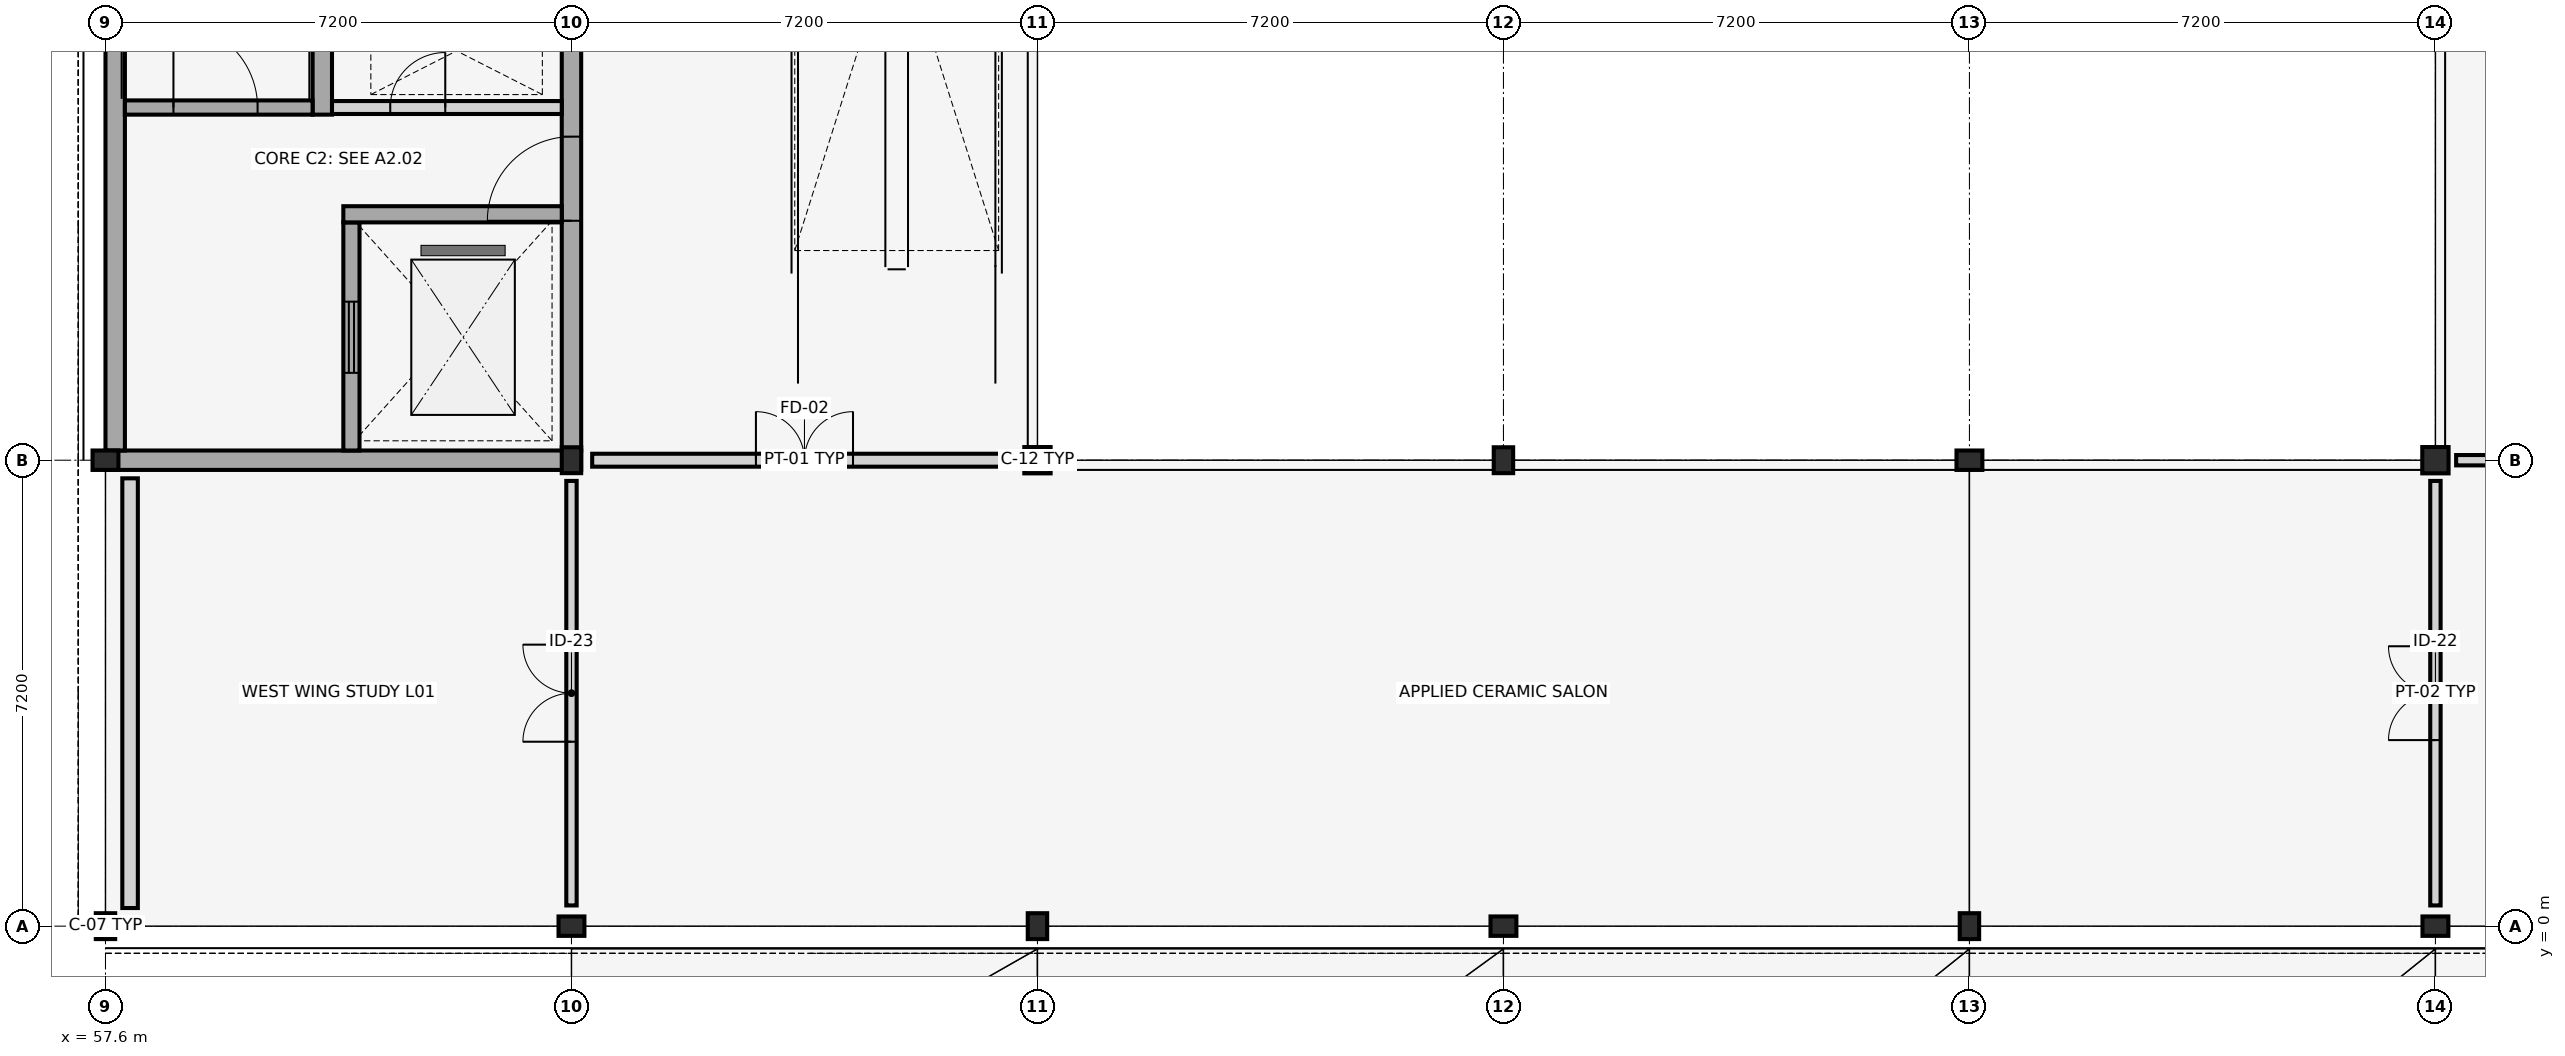
"""IFC4 building model, lengths in metres.
Left out: names, types, materials, properties, quantities, classifications, styles, units other than length and angle.
Written with IfcOpenShell. Run it as: python <this file> out.ifc"""

import sys

from ifc_helpers import new_model, si_unit, direction, frame, frame_2d, origin, origin_2d, place, context, subcontext, project, spatial, rectangle, hollow_circle, i_section, extrude, element, fill, save


model = new_model("IFC4")
c1 = context("Model", 3, precision=1e-05, world=origin(), true_north=direction((0.0, 1.0)))
c2 = subcontext(c1, "Body", "Model", "MODEL_VIEW")
j1 = project(units=[si_unit("LENGTHUNIT", "METRE"), si_unit("PLANEANGLEUNIT", "RADIAN")], contexts=[c1])
p1 = place(None, origin())
s1 = spatial("IfcSite", under=j1, at=p1, CompositionType="ELEMENT")
p2 = place(p1, origin())
s2 = spatial("IfcBuilding", under=s1, at=p2, CompositionType="ELEMENT")
p3 = place(p2, frame((0.0, 0.0, 4.5)))
s3 = spatial("IfcBuildingStorey", under=s2, at=p3, CompositionType="ELEMENT", Elevation=4.5)
for number, where, z_axis, x_axis in (
    (1, (57.6, 0.0, 0.0), (0.0, 0.0, 1.0), (1.0, 0.0, 0.0)),
    (2, (57.6, 7.2, 0.0), (0.0, 0.0, 1.0), (0.0, 1.0, 0.0)),
    (3, (64.8, 0.0, 0.0), (0.0, 0.0, 1.0), (0.0, 1.0, 0.0)),
    (4, (64.8, 7.2, 0.0), (0.0, 0.0, 1.0), (1.0, 0.0, 0.0)),
    (5, (72.0, 0.0, 0.0), (0.0, 0.0, 1.0), (1.0, 0.0, 0.0)),
):
    element("IfcColumn", number, at=place(p3, frame(where, z_axis=z_axis, x_axis=x_axis)), inside=s3, PredefinedType="COLUMN", context=c2, shape_type="SweptSolid", body=[
        extrude(i_section(OverallWidth=0.3, OverallDepth=0.4, WebThickness=0.013, FlangeThickness=0.024, FilletRadius=0.027, at=origin_2d()), origin(), (0.0, 0.0, 1.0), 4.2),
    ])
p4 = place(p3, frame((72.0, 7.2, 0.0), z_axis=(0.0, 0.0, 1.0), x_axis=(0.0, 1.0, 0.0)))
e6 = element("IfcColumn", 6, at=p4, inside=s3, PredefinedType="COLUMN", context=c2, shape_type="SweptSolid", body=[
    extrude(hollow_circle(Radius=0.203, WallThickness=0.016, at=origin_2d()), origin(), (0.0, 0.0, 1.0), 4.2),
])
for number, where, z_axis, x_axis in (
    (7, (79.2, 0.0, 0.0), (0.0, 0.0, 1.0), (0.0, 1.0, 0.0)),
    (8, (79.2, 7.2, 0.0), (0.0, 0.0, 1.0), (1.0, 0.0, 0.0)),
    (9, (86.4, 0.0, 0.0), (0.0, 0.0, 1.0), (1.0, 0.0, 0.0)),
    (10, (86.4, 7.2, 0.0), (0.0, 0.0, 1.0), (0.0, 1.0, 0.0)),
    (11, (93.6, 0.0, 0.0), (0.0, 0.0, 1.0), (0.0, 1.0, 0.0)),
):
    element("IfcColumn", number, at=place(p3, frame(where, z_axis=z_axis, x_axis=x_axis)), inside=s3, PredefinedType="COLUMN", context=c2, shape_type="SweptSolid", body=[
        extrude(i_section(OverallWidth=0.3, OverallDepth=0.4, WebThickness=0.013, FlangeThickness=0.024, FilletRadius=0.027, at=origin_2d()), origin(), (0.0, 0.0, 1.0), 4.2),
    ])
p5 = place(p3, frame((93.6, 7.2, 0.0), z_axis=(0.0, 0.0, 1.0), x_axis=(1.0, 0.0, 0.0)))
e12 = element("IfcColumn", 12, at=p5, inside=s3, PredefinedType="COLUMN", context=c2, shape_type="SweptSolid", body=[
    extrude(hollow_circle(Radius=0.203, WallThickness=0.016, at=origin_2d()), origin(), (0.0, 0.0, 1.0), 4.2),
])
p6 = place(p3, frame((57.98, 6.92, 0.0), z_axis=(0.0, 0.0, 1.0), x_axis=(0.0, -1.0, 0.0)))
e13 = element("IfcWall", 13, at=p6, inside=s3, PredefinedType="STANDARD", context=c2, shape_type="SweptSolid", body=[
    extrude(rectangle(XDim=6.64, YDim=0.24, at=frame_2d((3.32, 0.0))), origin(), (0.0, 0.0, 1.0), 3.58),
])
p7 = place(p3, frame((57.6, 7.2, 0.0), z_axis=(0.0, 0.0, 1.0), x_axis=(1.0, 0.0, 0.0)))
e14 = element("IfcWall", 14, at=p7, inside=s3, PredefinedType="SHEAR", context=c2, shape_type="SweptSolid", body=[
    extrude(rectangle(XDim=7.35, YDim=0.3, at=frame_2d((3.675, 0.0))), origin(), (0.0, 0.0, 1.0), 3.98),
])
p8 = place(p3, frame((57.75, 7.35, 0.0), z_axis=(0.0, 0.0, 1.0), x_axis=(0.0, 1.0, 0.0)))
e15 = element("IfcWall", 15, at=p8, inside=s3, PredefinedType="SHEAR", context=c2, shape_type="SweptSolid", body=[
    extrude(rectangle(XDim=14.1, YDim=0.3, at=frame_2d((7.05, 0.0))), origin(), (0.0, 0.0, 1.0), 3.98),
])
p9 = place(p3, frame((64.8, 7.35, 0.0), z_axis=(0.0, 0.0, 1.0), x_axis=(0.0, 1.0, 0.0)))
e16 = element("IfcWall", 16, at=p9, inside=s3, PredefinedType="SHEAR", context=c2, shape_type="SweptSolid", body=[
    extrude(rectangle(XDim=14.1, YDim=0.3, at=frame_2d((7.05, 0.0))), origin(), (0.0, 0.0, 1.0), 3.98),
])
p10 = place(p9, frame((3.55, 0.0, 0.0)))
e17 = element("IfcOpeningElement", 17, at=p10, cuts=e16, PredefinedType="OPENING", context=c2, shape_type="SweptSolid", body=[
    extrude(rectangle(XDim=1.3, YDim=2.2, at=frame_2d((0.65, 1.1))), frame((0.0, 0.16, 0.0), z_axis=(0.0, -1.0, 0.0), x_axis=(1.0, 0.0, 0.0)), (0.0, 0.0, 1.0), 0.32),
])
p11 = place(p9, frame((7.85, 0.0, 0.0)))
e18 = element("IfcOpeningElement", 18, at=p11, cuts=e16, PredefinedType="OPENING", context=c2, shape_type="SweptSolid", body=[
    extrude(rectangle(XDim=1.05, YDim=2.15, at=frame_2d((0.525, 1.075))), frame((0.0, 0.16, 0.0), z_axis=(0.0, -1.0, 0.0), x_axis=(1.0, 0.0, 0.0)), (0.0, 0.0, 1.0), 0.32),
])
p12 = place(p9, frame((10.55, 0.0, 0.0)))
e19 = element("IfcOpeningElement", 19, at=p12, cuts=e16, PredefinedType="OPENING", context=c2, shape_type="SweptSolid", body=[
    extrude(rectangle(XDim=1.0, YDim=2.15, at=frame_2d((0.5, 1.075))), frame((0.0, 0.16, 0.0), z_axis=(0.0, -1.0, 0.0), x_axis=(1.0, 0.0, 0.0)), (0.0, 0.0, 1.0), 0.32),
])
p13 = place(p3, frame((61.4, 7.35, 0.0), z_axis=(0.0, 0.0, 1.0), x_axis=(0.0, 1.0, 0.0)))
e20 = element("IfcWall", 20, at=p13, inside=s3, PredefinedType="SHEAR", context=c2, shape_type="SweptSolid", body=[
    extrude(rectangle(XDim=3.525, YDim=0.25, at=frame_2d((1.762, 0.0))), origin(), (0.0, 0.0, 1.0), 3.98),
])
p14 = place(p13, frame((1.2, 0.0, 0.0)))
e21 = element("IfcOpeningElement", 21, at=p14, cuts=e20, PredefinedType="OPENING", context=c2, shape_type="SweptSolid", body=[
    extrude(rectangle(XDim=1.1, YDim=2.15, at=frame_2d((0.55, 1.075))), frame((0.0, 0.135, 0.0), z_axis=(0.0, -1.0, 0.0), x_axis=(1.0, 0.0, 0.0)), (0.0, 0.0, 1.0), 0.27),
])
p15 = place(p3, frame((60.95, 12.54, 0.0), z_axis=(0.0, 0.0, 1.0), x_axis=(0.0, 1.0, 0.0)))
e22 = element("IfcWall", 22, at=p15, inside=s3, PredefinedType="SHEAR", context=c2, shape_type="SweptSolid", body=[
    extrude(rectangle(XDim=8.91, YDim=0.3, at=frame_2d((4.455, 0.0))), origin(), (0.0, 0.0, 1.0), 3.98),
])
p16 = place(p3, frame((61.1, 12.65, 0.0), z_axis=(0.0, 0.0, 1.0), x_axis=(1.0, 0.0, 0.0)))
e23 = element("IfcWall", 23, at=p16, inside=s3, PredefinedType="PLUMBINGWALL", context=c2, shape_type="SweptSolid", body=[
    extrude(rectangle(XDim=3.55, YDim=0.2, at=frame_2d((1.775, 0.0))), origin(), (0.0, 0.0, 1.0), 3.4),
])
p17 = place(p16, frame((0.9, 0.0, 0.0)))
e24 = element("IfcOpeningElement", 24, at=p17, cuts=e23, PredefinedType="OPENING", context=c2, shape_type="SweptSolid", body=[
    extrude(rectangle(XDim=0.85, YDim=2.05, at=frame_2d((0.425, 1.025))), frame((0.0, 0.11, 0.0), z_axis=(0.0, -1.0, 0.0), x_axis=(1.0, 0.0, 0.0)), (0.0, 0.0, 1.0), 0.22),
])
p18 = place(p3, frame((57.9, 12.65, 0.0), z_axis=(0.0, 0.0, 1.0), x_axis=(1.0, 0.0, 0.0)))
e25 = element("IfcWall", 25, at=p18, inside=s3, PredefinedType="SHEAR", context=c2, shape_type="SweptSolid", body=[
    extrude(rectangle(XDim=2.9, YDim=0.22, at=frame_2d((1.45, 0.0))), origin(), (0.0, 0.0, 1.0), 3.98),
])
p19 = place(p18, frame((0.75, 0.0, 0.0)))
e26 = element("IfcOpeningElement", 26, at=p19, cuts=e25, PredefinedType="OPENING", context=c2, shape_type="SweptSolid", body=[
    extrude(rectangle(XDim=1.3, YDim=2.2, at=frame_2d((0.65, 1.1))), frame((0.0, 0.12, 0.0), z_axis=(0.0, -1.0, 0.0), x_axis=(1.0, 0.0, 0.0)), (0.0, 0.0, 1.0), 0.24),
])
p20 = place(p3, frame((61.275, 11.0, 0.0), z_axis=(0.0, 0.0, 1.0), x_axis=(1.0, 0.0, 0.0)))
e27 = element("IfcWall", 27, at=p20, inside=s3, PredefinedType="SHEAR", context=c2, shape_type="SweptSolid", body=[
    extrude(rectangle(XDim=3.375, YDim=0.25, at=frame_2d((1.688, 0.0))), origin(), (0.0, 0.0, 1.0), 3.98),
])
p21 = place(p3, frame((65.12, 7.2, 0.0), z_axis=(0.0, 0.0, 1.0), x_axis=(1.0, 0.0, 0.0)))
e28 = element("IfcWall", 28, at=p21, inside=s3, PredefinedType="PARTITIONING", context=c2, shape_type="SweptSolid", body=[
    extrude(rectangle(XDim=6.56, YDim=0.2, at=frame_2d((3.28, 0.0))), origin(), (0.0, 0.0, 1.0), 3.15),
])
p22 = place(p21, frame((2.53, 0.0, 0.0)))
e29 = element("IfcOpeningElement", 29, at=p22, cuts=e28, PredefinedType="OPENING", context=c2, shape_type="SweptSolid", body=[
    extrude(rectangle(XDim=1.5, YDim=2.25, at=frame_2d((0.75, 1.125))), frame((0.0, 0.11, 0.0), z_axis=(0.0, -1.0, 0.0), x_axis=(1.0, 0.0, 0.0)), (0.0, 0.0, 1.0), 0.22),
])
p23 = place(p3, frame((93.6, 0.32, 0.0), z_axis=(0.0, 0.0, 1.0), x_axis=(0.0, 1.0, 0.0)))
e30 = element("IfcWall", 30, at=p23, inside=s3, PredefinedType="PARTITIONING", context=c2, shape_type="SweptSolid", body=[
    extrude(rectangle(XDim=6.56, YDim=0.16, at=frame_2d((3.28, 0.0))), origin(), (0.0, 0.0, 1.0), 3.15),
])
p24 = place(p23, frame((2.555, 0.0, 0.0)))
e31 = element("IfcOpeningElement", 31, at=p24, cuts=e30, PredefinedType="OPENING", context=c2, shape_type="SweptSolid", body=[
    extrude(rectangle(XDim=1.45, YDim=2.35, at=frame_2d((0.725, 1.175))), frame((0.0, 0.09, 0.0), z_axis=(0.0, -1.0, 0.0), x_axis=(1.0, 0.0, 0.0)), (0.0, 0.0, 1.0), 0.18),
])
p25 = place(p3, frame((64.8, 0.32, 0.0), z_axis=(0.0, 0.0, 1.0), x_axis=(0.0, 1.0, 0.0)))
e32 = element("IfcWall", 32, at=p25, inside=s3, PredefinedType="PARTITIONING", context=c2, shape_type="SweptSolid", body=[
    extrude(rectangle(XDim=6.56, YDim=0.16, at=frame_2d((3.28, 0.0))), origin(), (0.0, 0.0, 1.0), 3.15),
])
p26 = place(p25, frame((2.53, 0.0, 0.0)))
e33 = element("IfcOpeningElement", 33, at=p26, cuts=e32, PredefinedType="OPENING", context=c2, shape_type="SweptSolid", body=[
    extrude(rectangle(XDim=1.5, YDim=2.5, at=frame_2d((0.75, 1.25))), frame((0.0, 0.09, 0.0), z_axis=(0.0, -1.0, 0.0), x_axis=(1.0, 0.0, 0.0)), (0.0, 0.0, 1.0), 0.18),
])
p27 = place(p3, frame((93.92, 7.2, 0.0), z_axis=(0.0, 0.0, 1.0), x_axis=(1.0, 0.0, 0.0)))
e34 = element("IfcWall", 34, at=p27, inside=s3, PredefinedType="PARTITIONING", context=c2, shape_type="SweptSolid", body=[
    extrude(rectangle(XDim=6.56, YDim=0.16, at=frame_2d((3.28, 0.0))), origin(), (0.0, 0.0, 1.0), 3.15),
])
p28 = place(p27, frame((2.205, 0.0, 0.0)))
e35 = element("IfcOpeningElement", 35, at=p28, cuts=e34, PredefinedType="OPENING", context=c2, shape_type="SweptSolid", body=[
    extrude(rectangle(XDim=2.15, YDim=2.65, at=frame_2d((1.075, 1.325))), frame((0.0, 0.09, 0.0), z_axis=(0.0, -1.0, 0.0), x_axis=(1.0, 0.0, 0.0)), (0.0, 0.0, 1.0), 0.18),
])
p29 = place(p10, origin())
e36 = element("IfcDoor", 36, at=p29, inside=s3, OperationType="SINGLE_SWING_LEFT", PredefinedType="DOOR", context=c2, shape_type="SweptSolid", body=[
    extrude(rectangle(XDim=1.3, YDim=2.2, at=frame_2d((0.65, 1.1))), frame((0.0, 0.025, 0.0), z_axis=(0.0, -1.0, 0.0), x_axis=(1.0, 0.0, 0.0)), (0.0, 0.0, 1.0), 0.05),
])
fill(e17, e36)
p30 = place(p14, origin())
e37 = element("IfcDoor", 37, at=p30, inside=s3, OperationType="SLIDING_TO_LEFT", PredefinedType="DOOR", context=c2, shape_type="SweptSolid", body=[
    extrude(rectangle(XDim=1.1, YDim=2.15, at=frame_2d((0.55, 1.075))), frame((0.0, 0.025, 0.0), z_axis=(0.0, -1.0, 0.0), x_axis=(1.0, 0.0, 0.0)), (0.0, 0.0, 1.0), 0.05),
])
fill(e21, e37)
p31 = place(p17, origin())
e38 = element("IfcDoor", 38, at=p31, inside=s3, OperationType="SINGLE_SWING_RIGHT", PredefinedType="TRAPDOOR", context=c2, shape_type="SweptSolid", body=[
    extrude(rectangle(XDim=0.85, YDim=2.05, at=frame_2d((0.425, 1.025))), frame((0.0, 0.025, 0.0), z_axis=(0.0, -1.0, 0.0), x_axis=(1.0, 0.0, 0.0)), (0.0, 0.0, 1.0), 0.05),
])
fill(e24, e38)
p32 = place(p19, origin())
e39 = element("IfcDoor", 39, at=p32, inside=s3, OperationType="SINGLE_SWING_LEFT", PredefinedType="DOOR", context=c2, shape_type="SweptSolid", body=[
    extrude(rectangle(XDim=1.3, YDim=2.2, at=frame_2d((0.65, 1.1))), frame((0.0, 0.025, 0.0), z_axis=(0.0, -1.0, 0.0), x_axis=(1.0, 0.0, 0.0)), (0.0, 0.0, 1.0), 0.05),
])
fill(e26, e39)
p33 = place(p22, origin())
e40 = element("IfcDoor", 40, at=p33, inside=s3, OperationType="DOUBLE_DOOR_SINGLE_SWING", PredefinedType="DOOR", context=c2, shape_type="SweptSolid", body=[
    extrude(rectangle(XDim=1.5, YDim=2.25, at=frame_2d((0.75, 1.125))), frame((0.0, 0.025, 0.0), z_axis=(0.0, -1.0, 0.0), x_axis=(1.0, 0.0, 0.0)), (0.0, 0.0, 1.0), 0.05),
])
fill(e29, e40)
p34 = place(p24, origin())
e41 = element("IfcDoor", 41, at=p34, inside=s3, OperationType="DOUBLE_DOOR_SINGLE_SWING", PredefinedType="DOOR", context=c2, shape_type="SweptSolid", body=[
    extrude(rectangle(XDim=1.45, YDim=2.35, at=frame_2d((0.725, 1.175))), frame((0.0, 0.025, 0.0), z_axis=(0.0, -1.0, 0.0), x_axis=(1.0, 0.0, 0.0)), (0.0, 0.0, 1.0), 0.05),
])
fill(e31, e41)
p35 = place(p26, origin())
e42 = element("IfcDoor", 42, at=p35, inside=s3, OperationType="DOUBLE_DOOR_SINGLE_SWING", PredefinedType="DOOR", context=c2, shape_type="SweptSolid", body=[
    extrude(rectangle(XDim=1.5, YDim=2.5, at=frame_2d((0.75, 1.25))), frame((0.0, 0.025, 0.0), z_axis=(0.0, -1.0, 0.0), x_axis=(1.0, 0.0, 0.0)), (0.0, 0.0, 1.0), 0.05),
])
fill(e33, e42)
save(model, sys.argv[1])
